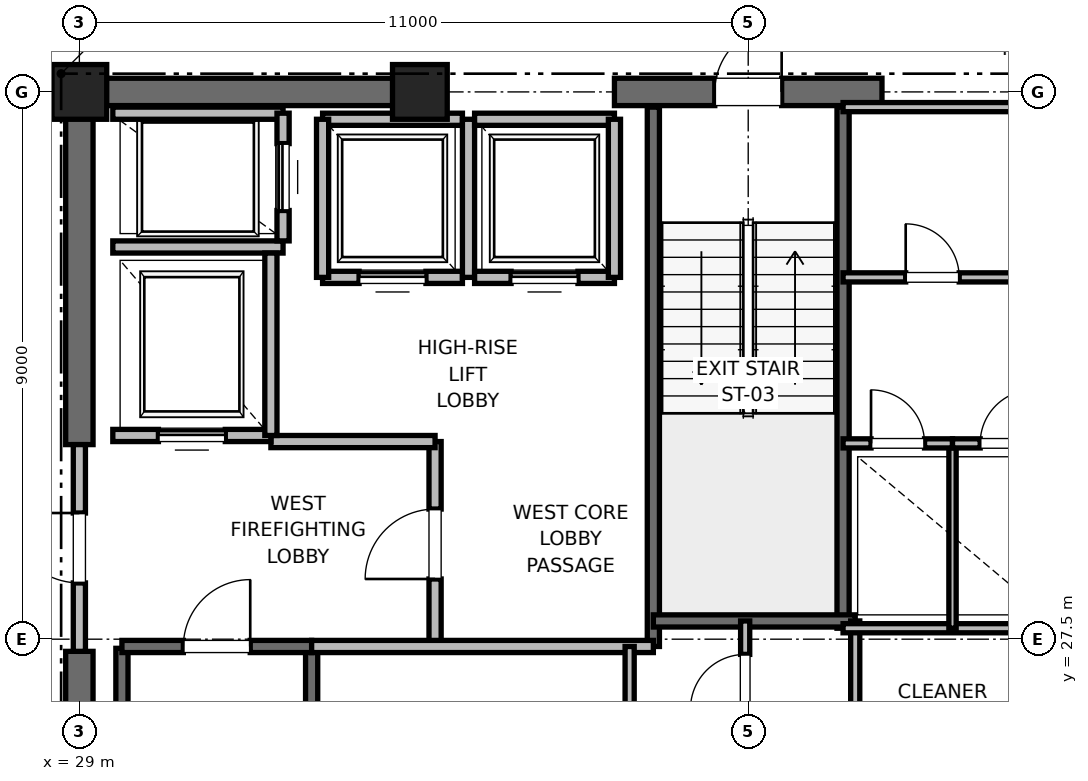
"""IFC4 building model, lengths in metres.
Left out: names, types, materials, properties, quantities, classifications, styles, units other than length and angle.
Written with IfcOpenShell. Run it as: python <this file> out.ifc"""

import sys

from ifc_helpers import new_model, si_unit, direction, frame, frame_2d, origin, origin_2d, place, context, subcontext, project, spatial, rectangle, extrude, element, fill, save


model = new_model("IFC4")
c1 = context("Model", 3, precision=1e-05, world=origin(), true_north=direction((0.0, 1.0)))
c2 = subcontext(c1, "Body", "Model", "MODEL_VIEW")
j1 = project(units=[si_unit("LENGTHUNIT", "METRE"), si_unit("PLANEANGLEUNIT", "RADIAN")], contexts=[c1])
p1 = place(None, origin())
s1 = spatial("IfcSite", under=j1, at=p1, CompositionType="ELEMENT")
p2 = place(p1, origin())
s2 = spatial("IfcBuilding", under=s1, at=p2, CompositionType="ELEMENT")
p3 = place(p2, frame((0.0, 0.0, 255.2)))
s3 = spatial("IfcBuildingStorey", under=s2, at=p3, CompositionType="ELEMENT", Elevation=255.2)
for number, where, z_axis, x_axis in (
    (1, (29.0, 36.5, 0.0), (0.0, 0.0, 1.0), (1.0, 0.0, 0.0)),
    (2, (34.6, 36.5, 0.0), (0.0, 0.0, 1.0), (1.0, 0.0, 0.0)),
):
    element("IfcColumn", number, at=place(p3, frame(where, z_axis=z_axis, x_axis=x_axis)), inside=s3, PredefinedType="PILASTER", context=c2, shape_type="SweptSolid", body=[
        extrude(rectangle(XDim=0.9, YDim=0.9, at=origin_2d()), origin(), (0.0, 0.0, 1.0), 4.0),
    ])
p4 = place(p3, frame((29.0, 36.5, 0.0), z_axis=(0.0, 0.0, 1.0), x_axis=(1.0, 0.0, 0.0)))
e3 = element("IfcWall", 3, at=p4, inside=s3, PredefinedType="SHEAR", context=c2, shape_type="SweptSolid", body=[
    extrude(rectangle(XDim=5.8, YDim=0.45, at=frame_2d((2.9, 0.0))), origin(), (0.0, 0.0, 1.0), 3.785),
])
p5 = place(p3, frame((37.8, 36.5, 0.0), z_axis=(0.0, 0.0, 1.0), x_axis=(1.0, 0.0, 0.0)))
e4 = element("IfcWall", 4, at=p5, inside=s3, PredefinedType="SHEAR", context=c2, shape_type="SweptSolid", body=[
    extrude(rectangle(XDim=4.4, YDim=0.45, at=frame_2d((2.2, 0.0))), origin(), (0.0, 0.0, 1.0), 3.785),
])
p6 = place(p5, frame((1.65, 0.0, 0.0)))
e5 = element("IfcOpeningElement", 5, at=p6, cuts=e4, PredefinedType="OPENING", context=c2, shape_type="SweptSolid", body=[
    extrude(rectangle(XDim=1.1, YDim=2.15, at=frame_2d((0.55, 1.075))), frame((0.0, 0.225, 0.0), z_axis=(0.0, -1.0, 0.0), x_axis=(1.0, 0.0, 0.0)), (0.0, 0.0, 1.0), 0.45),
])
p7 = place(p3, frame((29.0, 18.5, 0.0), z_axis=(0.0, 0.0, 1.0), x_axis=(0.0, 1.0, 0.0)))
e6 = element("IfcWall", 6, at=p7, inside=s3, PredefinedType="SHEAR", context=c2, shape_type="SweptSolid", body=[
    extrude(rectangle(XDim=8.8, YDim=0.45, at=frame_2d((4.4, 0.0))), origin(), (0.0, 0.0, 1.0), 3.785),
])
p8 = place(p3, frame((29.0, 30.7, 0.0), z_axis=(0.0, 0.0, 1.0), x_axis=(0.0, 1.0, 0.0)))
e7 = element("IfcWall", 7, at=p8, inside=s3, PredefinedType="SHEAR", context=c2, shape_type="SweptSolid", body=[
    extrude(rectangle(XDim=5.8, YDim=0.45, at=frame_2d((2.9, 0.0))), origin(), (0.0, 0.0, 1.0), 3.785),
])
p9 = place(p3, frame((29.7, 19.2, 0.0), z_axis=(0.0, 0.0, 1.0), x_axis=(0.0, 1.0, 0.0)))
e8 = element("IfcWall", 8, at=p9, inside=s3, PredefinedType="SOLIDWALL", context=c2, shape_type="SweptSolid", body=[
    extrude(rectangle(XDim=8.15, YDim=0.2, at=frame_2d((4.075, 0.0))), origin(), (0.0, 0.0, 1.0), 3.785),
])
p10 = place(p3, frame((32.82, 18.6, 0.0), z_axis=(0.0, 0.0, 1.0), x_axis=(0.0, 1.0, 0.0)))
e9 = element("IfcWall", 9, at=p10, inside=s3, PredefinedType="SOLIDWALL", context=c2, shape_type="SweptSolid", body=[
    extrude(rectangle(XDim=8.78, YDim=0.2, at=frame_2d((4.39, 0.0))), origin(), (0.0, 0.0, 1.0), 3.785),
])
p11 = place(p3, frame((29.7, 27.38, 0.0), z_axis=(0.0, 0.0, 1.0), x_axis=(1.0, 0.0, 0.0)))
e10 = element("IfcWall", 10, at=p11, inside=s3, PredefinedType="SOLIDWALL", context=c2, shape_type="SweptSolid", body=[
    extrude(rectangle(XDim=3.12, YDim=0.2, at=frame_2d((1.56, 0.0))), origin(), (0.0, 0.0, 1.0), 3.785),
])
p12 = place(p11, frame((1.01, 0.0, 0.0)))
e11 = element("IfcOpeningElement", 11, at=p12, cuts=e10, PredefinedType="OPENING", context=c2, shape_type="SweptSolid", body=[
    extrude(rectangle(XDim=1.1, YDim=2.15, at=frame_2d((0.55, 1.075))), frame((0.0, 0.1, 0.0), z_axis=(0.0, -1.0, 0.0), x_axis=(1.0, 0.0, 0.0)), (0.0, 0.0, 1.0), 0.2),
])
p13 = place(p3, frame((38.44, 27.38, 0.0), z_axis=(0.0, 0.0, 1.0), x_axis=(0.0, 1.0, 0.0)))
e12 = element("IfcWall", 12, at=p13, inside=s3, PredefinedType="SOLIDWALL", context=c2, shape_type="SweptSolid", body=[
    extrude(rectangle(XDim=8.87, YDim=0.2, at=frame_2d((4.435, 0.0))), origin(), (0.0, 0.0, 1.0), 3.785),
])
p14 = place(p3, frame((41.56, 27.68, 0.0), z_axis=(0.0, 0.0, 1.0), x_axis=(0.0, 1.0, 0.0)))
e13 = element("IfcWall", 13, at=p14, inside=s3, PredefinedType="SOLIDWALL", context=c2, shape_type="SweptSolid", body=[
    extrude(rectangle(XDim=8.57, YDim=0.2, at=frame_2d((4.285, 0.0))), origin(), (0.0, 0.0, 1.0), 3.785),
])
p15 = place(p3, frame((38.44, 27.8, 0.0), z_axis=(0.0, 0.0, 1.0), x_axis=(1.0, 0.0, 0.0)))
e14 = element("IfcWall", 14, at=p15, inside=s3, PredefinedType="SOLIDWALL", context=c2, shape_type="SweptSolid", body=[
    extrude(rectangle(XDim=3.32, YDim=0.2, at=frame_2d((1.66, 0.0))), origin(), (0.0, 0.0, 1.0), 3.785),
])
p16 = place(p3, frame((34.85, 27.38, 0.0), z_axis=(0.0, 0.0, 1.0), x_axis=(0.0, 1.0, 0.0)))
e15 = element("IfcWall", 15, at=p16, inside=s3, PredefinedType="PARTITIONING", context=c2, shape_type="SweptSolid", body=[
    extrude(rectangle(XDim=3.37, YDim=0.2, at=frame_2d((1.685, 0.0))), origin(), (0.0, 0.0, 1.0), 3.785),
])
p17 = place(p16, frame((1.11, 0.0, 0.0)))
e16 = element("IfcOpeningElement", 16, at=p17, cuts=e15, PredefinedType="OPENING", context=c2, shape_type="SweptSolid", body=[
    extrude(rectangle(XDim=1.15, YDim=2.2, at=frame_2d((0.575, 1.1))), frame((0.0, 0.1, 0.0), z_axis=(0.0, -1.0, 0.0), x_axis=(1.0, 0.0, 0.0)), (0.0, 0.0, 1.0), 0.2),
])
p18 = place(p3, frame((29.0, 27.3, 0.0), z_axis=(0.0, 0.0, 1.0), x_axis=(0.0, 1.0, 0.0)))
e17 = element("IfcWall", 17, at=p18, inside=s3, PredefinedType="PARTITIONING", context=c2, shape_type="SweptSolid", body=[
    extrude(rectangle(XDim=3.4, YDim=0.2, at=frame_2d((1.7, 0.0))), origin(), (0.0, 0.0, 1.0), 2.865),
])
p19 = place(p18, frame((1.125, 0.0, 0.0)))
e18 = element("IfcOpeningElement", 18, at=p19, cuts=e17, PredefinedType="OPENING", context=c2, shape_type="SweptSolid", body=[
    extrude(rectangle(XDim=1.15, YDim=2.2, at=frame_2d((0.575, 1.1))), frame((0.0, 0.1, 0.0), z_axis=(0.0, -1.0, 0.0), x_axis=(1.0, 0.0, 0.0)), (0.0, 0.0, 1.0), 0.2),
])
p20 = place(p3, frame((32.82, 27.38, 0.0), z_axis=(0.0, 0.0, 1.0), x_axis=(1.0, 0.0, 0.0)))
e19 = element("IfcWall", 19, at=p20, inside=s3, PredefinedType="PARTITIONING", context=c2, shape_type="SweptSolid", body=[
    extrude(rectangle(XDim=5.62, YDim=0.2, at=frame_2d((2.81, 0.0))), origin(), (0.0, 0.0, 1.0), 3.785),
])
p21 = place(p3, frame((32.15, 30.75, 0.0), z_axis=(0.0, 0.0, 1.0), x_axis=(1.0, 0.0, 0.0)))
e20 = element("IfcWall", 20, at=p21, inside=s3, PredefinedType="PARTITIONING", context=c2, shape_type="SweptSolid", body=[
    extrude(rectangle(XDim=2.7, YDim=0.2, at=frame_2d((1.35, 0.0))), origin(), (0.0, 0.0, 1.0), 3.785),
])
p22 = place(p3, frame((29.55, 30.85, 0.0), z_axis=(0.0, 0.0, 1.0), x_axis=(1.0, 0.0, 0.0)))
e21 = element("IfcWall", 21, at=p22, inside=s3, PredefinedType="SOLIDWALL", context=c2, shape_type="SweptSolid", body=[
    extrude(rectangle(XDim=2.6, YDim=0.2, at=frame_2d((1.3, 0.0))), origin(), (0.0, 0.0, 1.0), 2.865),
])
p23 = place(p22, frame((0.75, 0.0, 0.0)))
e22 = element("IfcOpeningElement", 22, at=p23, cuts=e21, PredefinedType="OPENING", context=c2, shape_type="SweptSolid", body=[
    extrude(rectangle(XDim=1.1, YDim=2.2, at=frame_2d((0.55, 1.1))), frame((0.0, 0.1, 0.0), z_axis=(0.0, -1.0, 0.0), x_axis=(1.0, 0.0, 0.0)), (0.0, 0.0, 1.0), 0.2),
])
p24 = place(p3, frame((29.55, 33.95, 0.0), z_axis=(0.0, 0.0, 1.0), x_axis=(1.0, 0.0, 0.0)))
e23 = element("IfcWall", 23, at=p24, inside=s3, PredefinedType="SOLIDWALL", context=c2, shape_type="SweptSolid", body=[
    extrude(rectangle(XDim=2.8, YDim=0.2, at=frame_2d((1.4, 0.0))), origin(), (0.0, 0.0, 1.0), 3.785),
])
p25 = place(p3, frame((32.15, 30.85, 0.0), z_axis=(0.0, 0.0, 1.0), x_axis=(0.0, 1.0, 0.0)))
e24 = element("IfcWall", 24, at=p25, inside=s3, PredefinedType="SOLIDWALL", context=c2, shape_type="SweptSolid", body=[
    extrude(rectangle(XDim=3.0, YDim=0.2, at=frame_2d((1.5, 0.0))), origin(), (0.0, 0.0, 1.0), 3.785),
])
p26 = place(p3, frame((32.35, 36.15, 0.0), z_axis=(0.0, 0.0, 1.0), x_axis=(-1.0, 0.0, 0.0)))
e25 = element("IfcWall", 25, at=p26, inside=s3, PredefinedType="SOLIDWALL", context=c2, shape_type="SweptSolid", body=[
    extrude(rectangle(XDim=2.8, YDim=0.2, at=frame_2d((1.4, 0.0))), origin(), (0.0, 0.0, 1.0), 3.148),
])
p27 = place(p3, frame((32.35, 34.05, 0.0), z_axis=(0.0, 0.0, 1.0), x_axis=(0.0, 1.0, 0.0)))
e26 = element("IfcWall", 26, at=p27, inside=s3, PredefinedType="SOLIDWALL", context=c2, shape_type="SweptSolid", body=[
    extrude(rectangle(XDim=2.1, YDim=0.2, at=frame_2d((1.05, 0.0))), origin(), (0.0, 0.0, 1.0), 3.785),
])
p28 = place(p27, frame((0.5, 0.0, 0.0)))
e27 = element("IfcOpeningElement", 27, at=p28, cuts=e26, PredefinedType="OPENING", context=c2, shape_type="SweptSolid", body=[
    extrude(rectangle(XDim=1.1, YDim=2.2, at=frame_2d((0.55, 1.1))), frame((0.0, 0.1, 0.0), z_axis=(0.0, -1.0, 0.0), x_axis=(1.0, 0.0, 0.0)), (0.0, 0.0, 1.0), 0.2),
])
p29 = place(p3, frame((33.0, 33.45, 0.0), z_axis=(0.0, 0.0, 1.0), x_axis=(1.0, 0.0, 0.0)))
e28 = element("IfcWall", 28, at=p29, inside=s3, PredefinedType="SOLIDWALL", context=c2, shape_type="SweptSolid", body=[
    extrude(rectangle(XDim=2.3, YDim=0.2, at=frame_2d((1.15, 0.0))), origin(), (0.0, 0.0, 1.0), 3.785),
])
p30 = place(p29, frame((0.6, 0.0, 0.0)))
e29 = element("IfcOpeningElement", 29, at=p30, cuts=e28, PredefinedType="OPENING", context=c2, shape_type="SweptSolid", body=[
    extrude(rectangle(XDim=1.1, YDim=2.2, at=frame_2d((0.55, 1.1))), frame((0.0, 0.1, 0.0), z_axis=(0.0, -1.0, 0.0), x_axis=(1.0, 0.0, 0.0)), (0.0, 0.0, 1.0), 0.2),
])
p31 = place(p3, frame((35.3, 36.05, 0.0), z_axis=(0.0, 0.0, 1.0), x_axis=(-1.0, 0.0, 0.0)))
e30 = element("IfcWall", 30, at=p31, inside=s3, PredefinedType="SOLIDWALL", context=c2, shape_type="SweptSolid", body=[
    extrude(rectangle(XDim=2.3, YDim=0.2, at=frame_2d((1.15, 0.0))), origin(), (0.0, 0.0, 1.0), 2.865),
])
p32 = place(p3, frame((33.0, 36.05, 0.0), z_axis=(0.0, 0.0, 1.0), x_axis=(0.0, -1.0, 0.0)))
e31 = element("IfcWall", 31, at=p32, inside=s3, PredefinedType="SOLIDWALL", context=c2, shape_type="SweptSolid", body=[
    extrude(rectangle(XDim=2.6, YDim=0.2, at=frame_2d((1.3, 0.0))), origin(), (0.0, 0.0, 1.0), 3.785),
])
p33 = place(p3, frame((35.4, 33.45, 0.0), z_axis=(0.0, 0.0, 1.0), x_axis=(0.0, 1.0, 0.0)))
e32 = element("IfcWall", 32, at=p33, inside=s3, PredefinedType="SOLIDWALL", context=c2, shape_type="SweptSolid", body=[
    extrude(rectangle(XDim=2.6, YDim=0.2, at=frame_2d((1.3, 0.0))), origin(), (0.0, 0.0, 1.0), 2.865),
])
p34 = place(p3, frame((35.5, 33.45, 0.0), z_axis=(0.0, 0.0, 1.0), x_axis=(1.0, 0.0, 0.0)))
e33 = element("IfcWall", 33, at=p34, inside=s3, PredefinedType="SOLIDWALL", context=c2, shape_type="SweptSolid", body=[
    extrude(rectangle(XDim=2.3, YDim=0.2, at=frame_2d((1.15, 0.0))), origin(), (0.0, 0.0, 1.0), 3.785),
])
p35 = place(p34, frame((0.6, 0.0, 0.0)))
e34 = element("IfcOpeningElement", 34, at=p35, cuts=e33, PredefinedType="OPENING", context=c2, shape_type="SweptSolid", body=[
    extrude(rectangle(XDim=1.1, YDim=2.2, at=frame_2d((0.55, 1.1))), frame((0.0, 0.1, 0.0), z_axis=(0.0, -1.0, 0.0), x_axis=(1.0, 0.0, 0.0)), (0.0, 0.0, 1.0), 0.2),
])
p36 = place(p3, frame((37.8, 36.05, 0.0), z_axis=(0.0, 0.0, 1.0), x_axis=(-1.0, 0.0, 0.0)))
e35 = element("IfcWall", 35, at=p36, inside=s3, PredefinedType="SOLIDWALL", context=c2, shape_type="SweptSolid", body=[
    extrude(rectangle(XDim=2.3, YDim=0.2, at=frame_2d((1.15, 0.0))), origin(), (0.0, 0.0, 1.0), 2.865),
])
p37 = place(p3, frame((37.8, 33.45, 0.0), z_axis=(0.0, 0.0, 1.0), x_axis=(0.0, 1.0, 0.0)))
e36 = element("IfcWall", 36, at=p37, inside=s3, PredefinedType="SOLIDWALL", context=c2, shape_type="SweptSolid", body=[
    extrude(rectangle(XDim=2.6, YDim=0.2, at=frame_2d((1.3, 0.0))), origin(), (0.0, 0.0, 1.0), 2.865),
])
p38 = place(p3, frame((41.76, 23.8, 0.0), z_axis=(0.0, 0.0, 1.0), x_axis=(0.0, 1.0, 0.0)))
e37 = element("IfcWall", 37, at=p38, inside=s3, PredefinedType="PARTITIONING", context=c2, shape_type="SweptSolid", body=[
    extrude(rectangle(XDim=4.0, YDim=0.15, at=frame_2d((2.0, 0.0))), origin(), (0.0, 0.0, 1.0), 2.85),
])
p39 = place(p3, frame((39.95, 25.8, 0.0), z_axis=(0.0, 0.0, 1.0), x_axis=(0.0, 1.0, 0.0)))
e38 = element("IfcWall", 38, at=p39, inside=s3, PredefinedType="PARTITIONING", context=c2, shape_type="SweptSolid", body=[
    extrude(rectangle(XDim=2.0, YDim=0.15, at=frame_2d((1.0, 0.0))), origin(), (0.0, 0.0, 1.0), 2.85),
])
p40 = place(p39, frame((0.55, 0.0, 0.0)))
e39 = element("IfcOpeningElement", 39, at=p40, cuts=e38, PredefinedType="OPENING", context=c2, shape_type="SweptSolid", body=[
    extrude(rectangle(XDim=0.9, YDim=2.1, at=frame_2d((0.45, 1.05))), frame((0.0, 0.075, 0.0), z_axis=(0.0, -1.0, 0.0), x_axis=(1.0, 0.0, 0.0)), (0.0, 0.0, 1.0), 0.15),
])
p41 = place(p3, frame((38.05, 23.06, 0.0), z_axis=(0.0, 0.0, 1.0), x_axis=(0.0, 1.0, 0.0)))
e40 = element("IfcWall", 40, at=p41, inside=s3, PredefinedType="PARTITIONING", context=c2, shape_type="SweptSolid", body=[
    extrude(rectangle(XDim=4.32, YDim=0.15, at=frame_2d((2.16, 0.0))), origin(), (0.0, 0.0, 1.0), 2.85),
])
p42 = place(p41, frame((1.66, 0.0, 0.0)))
e41 = element("IfcOpeningElement", 41, at=p42, cuts=e40, PredefinedType="OPENING", context=c2, shape_type="SweptSolid", body=[
    extrude(rectangle(XDim=1.0, YDim=2.15, at=frame_2d((0.5, 1.075))), frame((0.0, 0.075, 0.0), z_axis=(0.0, -1.0, 0.0), x_axis=(1.0, 0.0, 0.0)), (0.0, 0.0, 1.0), 0.15),
])
p43 = place(p3, frame((41.56, 27.68, 0.0), z_axis=(0.0, 0.0, 1.0), x_axis=(1.0, 0.0, 0.0)))
e42 = element("IfcWall", 42, at=p43, inside=s3, PredefinedType="PARTITIONING", context=c2, shape_type="SweptSolid", body=[
    extrude(rectangle(XDim=3.59, YDim=0.15, at=frame_2d((1.795, 0.0))), origin(), (0.0, 0.0, 1.0), 2.85),
])
p44 = place(p3, frame((43.36, 27.68, 0.0), z_axis=(0.0, 0.0, 1.0), x_axis=(0.0, 1.0, 0.0)))
e43 = element("IfcWall", 43, at=p44, inside=s3, PredefinedType="PARTITIONING", context=c2, shape_type="SweptSolid", body=[
    extrude(rectangle(XDim=3.04, YDim=0.12, at=frame_2d((1.52, 0.0))), origin(), (0.0, 0.0, 1.0), 2.85),
])
p45 = place(p3, frame((41.56, 30.72, 0.0), z_axis=(0.0, 0.0, 1.0), x_axis=(1.0, 0.0, 0.0)))
e44 = element("IfcWall", 44, at=p45, inside=s3, PredefinedType="PARTITIONING", context=c2, shape_type="SweptSolid", body=[
    extrude(rectangle(XDim=1.8, YDim=0.15, at=frame_2d((0.9, 0.0))), origin(), (0.0, 0.0, 1.0), 2.85),
])
p46 = place(p45, frame((0.46, 0.0, 0.0)))
e45 = element("IfcOpeningElement", 45, at=p46, cuts=e44, PredefinedType="OPENING", context=c2, shape_type="SweptSolid", body=[
    extrude(rectangle(XDim=0.88, YDim=2.1, at=frame_2d((0.44, 1.05))), frame((0.0, 0.075, 0.0), z_axis=(0.0, -1.0, 0.0), x_axis=(1.0, 0.0, 0.0)), (0.0, 0.0, 1.0), 0.15),
])
p47 = place(p3, frame((43.36, 30.72, 0.0), z_axis=(0.0, 0.0, 1.0), x_axis=(1.0, 0.0, 0.0)))
e46 = element("IfcWall", 46, at=p47, inside=s3, PredefinedType="PARTITIONING", context=c2, shape_type="SweptSolid", body=[
    extrude(rectangle(XDim=1.79, YDim=0.15, at=frame_2d((0.895, 0.0))), origin(), (0.0, 0.0, 1.0), 2.85),
])
p48 = place(p47, frame((0.455, 0.0, 0.0)))
e47 = element("IfcOpeningElement", 47, at=p48, cuts=e46, PredefinedType="OPENING", context=c2, shape_type="SweptSolid", body=[
    extrude(rectangle(XDim=0.88, YDim=2.1, at=frame_2d((0.44, 1.05))), frame((0.0, 0.075, 0.0), z_axis=(0.0, -1.0, 0.0), x_axis=(1.0, 0.0, 0.0)), (0.0, 0.0, 1.0), 0.15),
])
p49 = place(p3, frame((41.56, 36.25, 0.0), z_axis=(0.0, 0.0, 1.0), x_axis=(1.0, 0.0, 0.0)))
e48 = element("IfcWall", 48, at=p49, inside=s3, PredefinedType="PARTITIONING", context=c2, shape_type="SweptSolid", body=[
    extrude(rectangle(XDim=2.94, YDim=0.15, at=frame_2d((1.47, 0.0))), origin(), (0.0, 0.0, 1.0), 2.85),
])
p50 = place(p3, frame((41.56, 33.45, 0.0), z_axis=(0.0, 0.0, 1.0), x_axis=(1.0, 0.0, 0.0)))
e49 = element("IfcWall", 49, at=p50, inside=s3, PredefinedType="PARTITIONING", context=c2, shape_type="SweptSolid", body=[
    extrude(rectangle(XDim=2.94, YDim=0.15, at=frame_2d((1.47, 0.0))), origin(), (0.0, 0.0, 1.0), 2.85),
])
p51 = place(p50, frame((1.03, 0.0, 0.0)))
e50 = element("IfcOpeningElement", 50, at=p51, cuts=e49, PredefinedType="OPENING", context=c2, shape_type="SweptSolid", body=[
    extrude(rectangle(XDim=0.88, YDim=2.1, at=frame_2d((0.44, 1.05))), frame((0.0, 0.075, 0.0), z_axis=(0.0, -1.0, 0.0), x_axis=(1.0, 0.0, 0.0)), (0.0, 0.0, 1.0), 0.15),
])
p52 = place(p12, origin())
e51 = element("IfcDoor", 51, at=p52, inside=s3, OperationType="SINGLE_SWING_RIGHT", PredefinedType="DOOR", context=c2, shape_type="SweptSolid", body=[
    extrude(rectangle(XDim=1.1, YDim=2.15, at=frame_2d((0.55, 1.075))), frame((0.0, 0.025, 0.0), z_axis=(0.0, -1.0, 0.0), x_axis=(1.0, 0.0, 0.0)), (0.0, 0.0, 1.0), 0.05),
])
fill(e11, e51)
p53 = place(p6, origin())
e52 = element("IfcDoor", 52, at=p53, inside=s3, OperationType="SINGLE_SWING_RIGHT", PredefinedType="DOOR", context=c2, shape_type="SweptSolid", body=[
    extrude(rectangle(XDim=1.1, YDim=2.15, at=frame_2d((0.55, 1.075))), frame((0.0, 0.025, 0.0), z_axis=(0.0, -1.0, 0.0), x_axis=(1.0, 0.0, 0.0)), (0.0, 0.0, 1.0), 0.05),
])
fill(e5, e52)
p54 = place(p17, origin())
e53 = element("IfcDoor", 53, at=p54, inside=s3, OperationType="SINGLE_SWING_LEFT", PredefinedType="DOOR", context=c2, shape_type="SweptSolid", body=[
    extrude(rectangle(XDim=1.15, YDim=2.2, at=frame_2d((0.575, 1.1))), frame((0.0, 0.025, 0.0), z_axis=(0.0, -1.0, 0.0), x_axis=(1.0, 0.0, 0.0)), (0.0, 0.0, 1.0), 0.05),
])
fill(e16, e53)
p55 = place(p19, origin())
e54 = element("IfcDoor", 54, at=p55, inside=s3, OperationType="SINGLE_SWING_RIGHT", PredefinedType="DOOR", context=c2, shape_type="SweptSolid", body=[
    extrude(rectangle(XDim=1.15, YDim=2.2, at=frame_2d((0.575, 1.1))), frame((0.0, 0.025, 0.0), z_axis=(0.0, -1.0, 0.0), x_axis=(1.0, 0.0, 0.0)), (0.0, 0.0, 1.0), 0.05),
])
fill(e18, e54)
p56 = place(p23, origin())
e55 = element("IfcDoor", 55, at=p56, inside=s3, OperationType="SLIDING_TO_RIGHT", PredefinedType="DOOR", context=c2, shape_type="SweptSolid", body=[
    extrude(rectangle(XDim=1.1, YDim=2.2, at=frame_2d((0.55, 1.1))), frame((0.0, 0.025, 0.0), z_axis=(0.0, -1.0, 0.0), x_axis=(1.0, 0.0, 0.0)), (0.0, 0.0, 1.0), 0.05),
])
fill(e22, e55)
p57 = place(p28, origin())
e56 = element("IfcDoor", 56, at=p57, inside=s3, OperationType="SLIDING_TO_RIGHT", PredefinedType="DOOR", context=c2, shape_type="SweptSolid", body=[
    extrude(rectangle(XDim=1.1, YDim=2.2, at=frame_2d((0.55, 1.1))), frame((0.0, 0.025, 0.0), z_axis=(0.0, -1.0, 0.0), x_axis=(1.0, 0.0, 0.0)), (0.0, 0.0, 1.0), 0.05),
])
fill(e27, e56)
p58 = place(p30, origin())
e57 = element("IfcDoor", 57, at=p58, inside=s3, OperationType="SLIDING_TO_RIGHT", PredefinedType="DOOR", context=c2, shape_type="SweptSolid", body=[
    extrude(rectangle(XDim=1.1, YDim=2.2, at=frame_2d((0.55, 1.1))), frame((0.0, 0.025, 0.0), z_axis=(0.0, -1.0, 0.0), x_axis=(1.0, 0.0, 0.0)), (0.0, 0.0, 1.0), 0.05),
])
fill(e29, e57)
p59 = place(p35, origin())
e58 = element("IfcDoor", 58, at=p59, inside=s3, OperationType="SLIDING_TO_RIGHT", PredefinedType="DOOR", context=c2, shape_type="SweptSolid", body=[
    extrude(rectangle(XDim=1.1, YDim=2.2, at=frame_2d((0.55, 1.1))), frame((0.0, 0.025, 0.0), z_axis=(0.0, -1.0, 0.0), x_axis=(1.0, 0.0, 0.0)), (0.0, 0.0, 1.0), 0.05),
])
fill(e34, e58)
p60 = place(p40, origin())
e59 = element("IfcDoor", 59, at=p60, inside=s3, OperationType="SINGLE_SWING_LEFT", PredefinedType="DOOR", context=c2, shape_type="SweptSolid", body=[
    extrude(rectangle(XDim=0.9, YDim=2.1, at=frame_2d((0.45, 1.05))), frame((0.0, 0.025, 0.0), z_axis=(0.0, -1.0, 0.0), x_axis=(1.0, 0.0, 0.0)), (0.0, 0.0, 1.0), 0.05),
])
fill(e39, e59)
p61 = place(p46, origin())
e60 = element("IfcDoor", 60, at=p61, inside=s3, OperationType="SINGLE_SWING_LEFT", PredefinedType="DOOR", context=c2, shape_type="SweptSolid", body=[
    extrude(rectangle(XDim=0.88, YDim=2.1, at=frame_2d((0.44, 1.05))), frame((0.0, 0.025, 0.0), z_axis=(0.0, -1.0, 0.0), x_axis=(1.0, 0.0, 0.0)), (0.0, 0.0, 1.0), 0.05),
])
fill(e45, e60)
p62 = place(p48, origin())
e61 = element("IfcDoor", 61, at=p62, inside=s3, OperationType="SINGLE_SWING_RIGHT", PredefinedType="DOOR", context=c2, shape_type="SweptSolid", body=[
    extrude(rectangle(XDim=0.88, YDim=2.1, at=frame_2d((0.44, 1.05))), frame((0.0, 0.025, 0.0), z_axis=(0.0, -1.0, 0.0), x_axis=(1.0, 0.0, 0.0)), (0.0, 0.0, 1.0), 0.05),
])
fill(e47, e61)
p63 = place(p51, origin())
e62 = element("IfcDoor", 62, at=p63, inside=s3, OperationType="SINGLE_SWING_LEFT", PredefinedType="DOOR", context=c2, shape_type="SweptSolid", body=[
    extrude(rectangle(XDim=0.88, YDim=2.1, at=frame_2d((0.44, 1.05))), frame((0.0, 0.025, 0.0), z_axis=(0.0, -1.0, 0.0), x_axis=(1.0, 0.0, 0.0)), (0.0, 0.0, 1.0), 0.05),
])
fill(e50, e62)
save(model, sys.argv[1])
